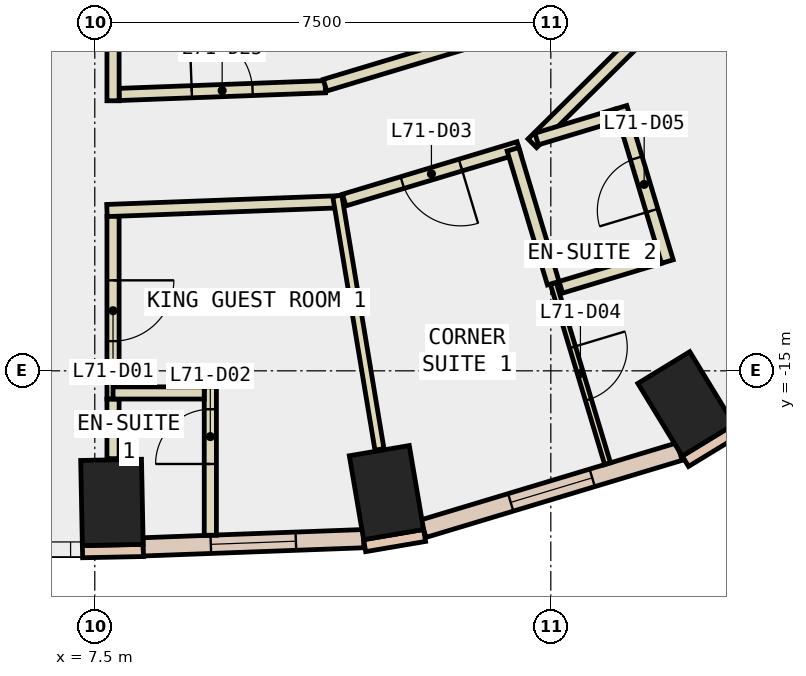
"""IFC4 building model, lengths in metres.
Left out: names, types, materials, properties, quantities, classifications, styles, units other than length and angle.
Written with IfcOpenShell. Run it as: python <this file> out.ifc"""

import sys

from ifc_helpers import new_model, si_unit, direction, frame, frame_2d, origin, origin_2d, place, context, subcontext, project, spatial, rectangle, extrude, element, fill, save


model = new_model("IFC4")
c1 = context("Model", 3, precision=1e-05, world=origin(), true_north=direction((0.0, 1.0)))
c2 = subcontext(c1, "Body", "Model", "MODEL_VIEW")
j1 = project(units=[si_unit("LENGTHUNIT", "METRE"), si_unit("PLANEANGLEUNIT", "RADIAN")], contexts=[c1])
p1 = place(None, origin())
s1 = spatial("IfcSite", under=j1, at=p1, CompositionType="ELEMENT")
p2 = place(p1, origin())
s2 = spatial("IfcBuilding", under=s1, at=p2, CompositionType="ELEMENT")
p3 = place(p2, frame((0.0, 0.0, 304.4)))
s3 = spatial("IfcBuildingStorey", under=s2, at=p3, CompositionType="ELEMENT", Elevation=304.4)
for number, where, z_axis, x_axis in (
    (1, (7.782, -17.164, -0.34), (0.0, 0.0, 1.0), (1.0, 0.02, 0.0)),
    (2, (12.297, -17.003, -0.34), (0.0, 0.0, 1.0), (0.986, 0.168, 0.0)),
    (3, (17.223, -15.544, -0.34), (0.0, 0.0, 1.0), (0.854, 0.521, 0.0)),
):
    element("IfcColumn", number, at=place(p3, frame(where, z_axis=z_axis, x_axis=x_axis)), inside=s3, PredefinedType="COLUMN", context=c2, shape_type="SweptSolid", body=[
        extrude(rectangle(XDim=1.0, YDim=1.4, at=origin_2d()), origin(), (0.0, 0.0, 1.0), 3.6),
    ])
for number, where, z_axis, x_axis in (
    (4, (7.298, -17.974, 0.0), (0.0, 0.0, 1.0), (1.0, 0.02, 0.0)),
    (5, (11.938, -17.875, 0.0), (0.0, 0.0, 1.0), (0.986, 0.168, 0.0)),
):
    element("IfcWall", number, at=place(p3, frame(where, z_axis=z_axis, x_axis=x_axis)), inside=s3, PredefinedType="STANDARD", context=c2, shape_type="SweptSolid", body=[
        extrude(rectangle(XDim=1.0, YDim=0.2, at=frame_2d((0.5, 0.0))), origin(), (0.0, 0.0, 1.0), 3.26),
    ])
p4 = place(p3, frame((17.213, -16.487, 0.0), z_axis=(0.0, 0.0, 1.0), x_axis=(0.853679739553, 0.520798331677, 0.0)))
e6 = element("IfcWall", 6, at=p4, inside=s3, PredefinedType="STANDARD", context=c2, shape_type="SweptSolid", body=[
    extrude(rectangle(XDim=1.0, YDim=0.2, at=frame_2d((0.5, 0.0))), origin(), (0.0, 0.0, 1.0), 3.26),
])
p5 = place(p3, frame((8.296, -17.895, 0.0), z_axis=(0.0, 0.0, 1.0), x_axis=(0.999306787149, 0.037228284377, 0.0)))
e7 = element("IfcWall", 7, at=p5, inside=s3, PredefinedType="STANDARD", context=c2, shape_type="SweptSolid", body=[
    extrude(rectangle(XDim=3.626, YDim=0.3, at=frame_2d((1.813, 0.0))), origin(), (0.0, 0.0, 1.0), 3.26),
])
p6 = place(p5, frame((1.113, 0.0, 0.9)))
e8 = element("IfcOpeningElement", 8, at=p6, cuts=e7, PredefinedType="OPENING", context=c2, shape_type="SweptSolid", body=[
    extrude(rectangle(XDim=1.4, YDim=2.0, at=frame_2d((0.7, 1.0))), frame((0.0, 0.16, 0.0), z_axis=(0.0, -1.0, 0.0), x_axis=(1.0, 0.0, 0.0)), (0.0, 0.0, 1.0), 0.32),
])
p7 = place(p3, frame((12.904, -17.596, 0.0), z_axis=(0.0, 0.0, 1.0), x_axis=(0.957563190743, 0.288223412884, 0.0)))
e9 = element("IfcWall", 9, at=p7, inside=s3, PredefinedType="STANDARD", context=c2, shape_type="SweptSolid", body=[
    extrude(rectangle(XDim=4.4, YDim=0.3, at=frame_2d((2.2, 0.0))), origin(), (0.0, 0.0, 1.0), 3.26),
])
p8 = place(p7, frame((1.5, 0.0, 0.9)))
e10 = element("IfcOpeningElement", 10, at=p8, cuts=e9, PredefinedType="OPENING", context=c2, shape_type="SweptSolid", body=[
    extrude(rectangle(XDim=1.4, YDim=2.0, at=frame_2d((0.7, 1.0))), frame((0.0, 0.16, 0.0), z_axis=(0.0, -1.0, 0.0), x_axis=(1.0, 0.0, 0.0)), (0.0, 0.0, 1.0), 0.32),
])
p9 = place(p3, frame((17.976, -15.82, 0.0), z_axis=(0.0, 0.0, 1.0), x_axis=(0.710893699296, 0.703299472701, 0.0)))
e11 = element("IfcWall", 11, at=p9, inside=s3, PredefinedType="STANDARD", context=c2, shape_type="SweptSolid", body=[
    extrude(rectangle(XDim=3.954, YDim=0.3, at=frame_2d((1.977, 0.0))), origin(), (0.0, 0.0, 1.0), 3.26),
])
p10 = place(p9, frame((1.277, 0.0, 0.9)))
e12 = element("IfcOpeningElement", 12, at=p10, cuts=e11, PredefinedType="OPENING", context=c2, shape_type="SweptSolid", body=[
    extrude(rectangle(XDim=1.4, YDim=2.0, at=frame_2d((0.7, 1.0))), frame((0.0, 0.16, 0.0), z_axis=(0.0, -1.0, 0.0), x_axis=(1.0, 0.0, 0.0)), (0.0, 0.0, 1.0), 0.32),
])
p11 = place(p3, frame((7.9, -10.455, 0.0), z_axis=(0.0, 0.0, 1.0), x_axis=(0.999297278907, 0.037482640915, 0.0)))
e13 = element("IfcWall", 13, at=p11, inside=s3, PredefinedType="PARTITIONING", context=c2, shape_type="SweptSolid", body=[
    extrude(rectangle(XDim=3.394, YDim=0.2, at=frame_2d((1.697, 0.0))), origin(), (0.0, 0.0, 1.0), 3.26),
])
p12 = place(p11, frame((1.196, 0.0, 0.0)))
e14 = element("IfcOpeningElement", 14, at=p12, cuts=e13, PredefinedType="OPENING", context=c2, shape_type="SweptSolid", body=[
    extrude(rectangle(XDim=1.0, YDim=2.1, at=frame_2d((0.5, 1.05))), frame((0.0, 0.11, 0.0), z_axis=(0.0, -1.0, 0.0), x_axis=(1.0, 0.0, 0.0)), (0.0, 0.0, 1.0), 0.22),
])
p13 = place(p3, frame((11.286, -10.303, 0.0), z_axis=(0.0, 0.0, 1.0), x_axis=(0.957555754851, 0.288248115955, 0.0)))
e15 = element("IfcWall", 15, at=p13, inside=s3, PredefinedType="PARTITIONING", context=c2, shape_type="SweptSolid", body=[
    extrude(rectangle(XDim=2.612, YDim=0.2, at=frame_2d((1.306, 0.0))), origin(), (0.0, 0.0, 1.0), 3.26),
])
p14 = place(p3, frame((11.53, -12.22, 0.0), z_axis=(0.0, 0.0, 1.0), x_axis=(-0.999293554816, -0.037581794833, 0.0)))
e16 = element("IfcWall", 16, at=p14, inside=s3, PredefinedType="PARTITIONING", context=c2, shape_type="SweptSolid", body=[
    extrude(rectangle(XDim=3.833, YDim=0.2, at=frame_2d((1.917, 0.0))), origin(), (0.0, 0.0, 1.0), 3.26),
])
p15 = place(p3, frame((14.473, -11.328, 0.0), z_axis=(0.0, 0.0, 1.0), x_axis=(-0.957599689503, -0.288102125406, 0.0)))
e17 = element("IfcWall", 17, at=p15, inside=s3, PredefinedType="PARTITIONING", context=c2, shape_type="SweptSolid", body=[
    extrude(rectangle(XDim=2.999, YDim=0.2, at=frame_2d((1.5, 0.0))), origin(), (0.0, 0.0, 1.0), 3.26),
])
p16 = place(p15, frame((1.0, 0.0, 0.0)))
e18 = element("IfcOpeningElement", 18, at=p16, cuts=e17, PredefinedType="OPENING", context=c2, shape_type="SweptSolid", body=[
    extrude(rectangle(XDim=1.0, YDim=2.1, at=frame_2d((0.5, 1.05))), frame((0.0, 0.11, 0.0), z_axis=(0.0, -1.0, 0.0), x_axis=(1.0, 0.0, 0.0)), (0.0, 0.0, 1.0), 0.22),
])
p17 = place(p3, frame((16.537, -9.436, 0.0), z_axis=(0.0, 0.0, 1.0), x_axis=(-0.710773151724, -0.703421301063, 0.0)))
e19 = element("IfcWall", 19, at=p17, inside=s3, PredefinedType="PARTITIONING", context=c2, shape_type="SweptSolid", body=[
    extrude(rectangle(XDim=2.59, YDim=0.2, at=frame_2d((1.295, 0.0))), origin(), (0.0, 0.0, 1.0), 3.26),
])
p18 = place(p3, frame((7.8, -5.899, 0.0), z_axis=(0.0, 0.0, 1.0), x_axis=(0.0, -1.0, 0.0)))
e20 = element("IfcWall", 20, at=p18, inside=s3, PredefinedType="PARTITIONING", context=c2, shape_type="SweptSolid", body=[
    extrude(rectangle(XDim=4.66, YDim=0.2, at=frame_2d((2.33, 0.0))), origin(), (0.0, 0.0, 1.0), 3.26),
])
p19 = place(p3, frame((7.8, -12.46, 0.0), z_axis=(0.0, 0.0, 1.0), x_axis=(0.0, -1.0, 0.0)))
e21 = element("IfcWall", 21, at=p19, inside=s3, PredefinedType="PARTITIONING", context=c2, shape_type="SweptSolid", body=[
    extrude(rectangle(XDim=3.004, YDim=0.2, at=frame_2d((1.502, 0.0))), origin(), (0.0, 0.0, 1.0), 3.26),
])
p20 = place(p19, frame((1.052, 0.0, 0.0)))
e22 = element("IfcOpeningElement", 22, at=p20, cuts=e21, PredefinedType="OPENING", context=c2, shape_type="SweptSolid", body=[
    extrude(rectangle(XDim=1.0, YDim=2.1, at=frame_2d((0.5, 1.05))), frame((0.0, 0.11, 0.0), z_axis=(0.0, -1.0, 0.0), x_axis=(1.0, 0.0, 0.0)), (0.0, 0.0, 1.0), 0.22),
])
p21 = place(p3, frame((7.8, -15.464, 0.0), z_axis=(0.0, 0.0, 1.0), x_axis=(0.0, -1.0, 0.0)))
e23 = element("IfcWall", 23, at=p21, inside=s3, PredefinedType="PARTITIONING", context=c2, shape_type="SweptSolid", body=[
    extrude(rectangle(XDim=0.98, YDim=0.2, at=frame_2d((0.49, 0.0))), origin(), (0.0, 0.0, 1.0), 3.26),
])
p22 = place(p3, frame((9.4, -17.704, 0.0), z_axis=(0.0, 0.0, 1.0), x_axis=(0.0, 1.0, 0.0)))
e24 = element("IfcWall", 24, at=p22, inside=s3, PredefinedType="PARTITIONING", context=c2, shape_type="SweptSolid", body=[
    extrude(rectangle(XDim=2.44, YDim=0.2, at=frame_2d((1.22, 0.0))), origin(), (0.0, 0.0, 1.0), 3.26),
])
p23 = place(p22, frame((1.172, 0.0, 0.0)))
e25 = element("IfcOpeningElement", 25, at=p23, cuts=e24, PredefinedType="OPENING", context=c2, shape_type="SweptSolid", body=[
    extrude(rectangle(XDim=0.9, YDim=2.1, at=frame_2d((0.45, 1.05))), frame((0.0, 0.11, 0.0), z_axis=(0.0, -1.0, 0.0), x_axis=(1.0, 0.0, 0.0)), (0.0, 0.0, 1.0), 0.22),
])
p24 = place(p3, frame((9.3, -15.364, 0.0), z_axis=(0.0, 0.0, 1.0), x_axis=(-1.0, 0.0, 0.0)))
e26 = element("IfcWall", 26, at=p24, inside=s3, PredefinedType="PARTITIONING", context=c2, shape_type="SweptSolid", body=[
    extrude(rectangle(XDim=1.5, YDim=0.2, at=frame_2d((0.75, 0.0))), origin(), (0.0, 0.0, 1.0), 3.26),
])
p25 = place(p3, frame((11.488, -12.123, 0.0), z_axis=(0.0, 0.0, 1.0), x_axis=(0.164174159643, -0.986431368776, 0.0)))
e27 = element("IfcWall", 27, at=p25, inside=s3, PredefinedType="PARTITIONING", context=c2, shape_type="SweptSolid", body=[
    extrude(rectangle(XDim=4.226, YDim=0.15, at=frame_2d((2.113, 0.0))), origin(), (0.0, 0.0, 1.0), 3.26),
])
p26 = place(p3, frame((15.04, -13.559, 0.0), z_axis=(0.0, 0.0, 1.0), x_axis=(0.288337370875, -0.957528882362, 0.0)))
e28 = element("IfcWall", 28, at=p26, inside=s3, PredefinedType="PARTITIONING", context=c2, shape_type="SweptSolid", body=[
    extrude(rectangle(XDim=3.101, YDim=0.1, at=frame_2d((1.55, 0.0))), origin(), (0.0, 0.0, 1.0), 3.26),
])
p27 = place(p26, frame((1.1, 0.0, 0.0)))
e29 = element("IfcOpeningElement", 29, at=p27, cuts=e28, PredefinedType="OPENING", context=c2, shape_type="SweptSolid", body=[
    extrude(rectangle(XDim=0.9, YDim=2.1, at=frame_2d((0.45, 1.05))), frame((0.0, 0.06, 0.0), z_axis=(0.0, -1.0, 0.0), x_axis=(1.0, 0.0, 0.0)), (0.0, 0.0, 1.0), 0.12),
])
p28 = place(p3, frame((14.378, -11.357, 0.0), z_axis=(0.0, 0.0, 1.0), x_axis=(0.287932252498, -0.957650780802, 0.0)))
e30 = element("IfcWall", 30, at=p28, inside=s3, PredefinedType="PARTITIONING", context=c2, shape_type="SweptSolid", body=[
    extrude(rectangle(XDim=2.3, YDim=0.2, at=frame_2d((1.15, 0.0))), origin(), (0.0, 0.0, 1.0), 3.26),
])
p29 = place(p3, frame((15.165, -13.626, 0.0), z_axis=(0.0, 0.0, 1.0), x_axis=(0.957565028189, 0.288217308275, 0.0)))
e31 = element("IfcWall", 31, at=p29, inside=s3, PredefinedType="PARTITIONING", context=c2, shape_type="SweptSolid", body=[
    extrude(rectangle(XDim=1.7, YDim=0.2, at=frame_2d((0.85, 0.0))), origin(), (0.0, 0.0, 1.0), 3.26),
])
p30 = place(p3, frame((16.917, -13.203, 0.0), z_axis=(0.0, 0.0, 1.0), x_axis=(-0.287998855134, 0.957630753183, 0.0)))
e32 = element("IfcWall", 32, at=p30, inside=s3, PredefinedType="PARTITIONING", context=c2, shape_type="SweptSolid", body=[
    extrude(rectangle(XDim=2.649, YDim=0.2, at=frame_2d((1.325, 0.0))), origin(), (0.0, 0.0, 1.0), 3.26),
])
p31 = place(p30, frame((0.875, 0.0, 0.0)))
e33 = element("IfcOpeningElement", 33, at=p31, cuts=e32, PredefinedType="OPENING", context=c2, shape_type="SweptSolid", body=[
    extrude(rectangle(XDim=0.9, YDim=2.1, at=frame_2d((0.45, 1.05))), frame((0.0, 0.11, 0.0), z_axis=(0.0, -1.0, 0.0), x_axis=(1.0, 0.0, 0.0)), (0.0, 0.0, 1.0), 0.22),
])
p32 = place(p3, frame((16.087, -10.79, 0.0), z_axis=(0.0, 0.0, 1.0), x_axis=(-0.957425655367, -0.288679951581, 0.0)))
e34 = element("IfcWall", 34, at=p32, inside=s3, PredefinedType="PARTITIONING", context=c2, shape_type="SweptSolid", body=[
    extrude(rectangle(XDim=1.378, YDim=0.2, at=frame_2d((0.689, 0.0))), origin(), (0.0, 0.0, 1.0), 3.26),
])
p33 = place(p6, origin())
e35 = element("IfcWindow", 35, at=p33, inside=s3, PartitioningType="SINGLE_PANEL", PredefinedType="WINDOW", context=c2, shape_type="SweptSolid", body=[
    extrude(rectangle(XDim=1.4, YDim=2.0, at=frame_2d((0.7, 1.0))), frame((0.0, 0.03, 0.0), z_axis=(0.0, -1.0, 0.0), x_axis=(1.0, 0.0, 0.0)), (0.0, 0.0, 1.0), 0.06),
])
fill(e8, e35)
p34 = place(p8, origin())
e36 = element("IfcWindow", 36, at=p34, inside=s3, PartitioningType="SINGLE_PANEL", PredefinedType="WINDOW", context=c2, shape_type="SweptSolid", body=[
    extrude(rectangle(XDim=1.4, YDim=2.0, at=frame_2d((0.7, 1.0))), frame((0.0, 0.03, 0.0), z_axis=(0.0, -1.0, 0.0), x_axis=(1.0, 0.0, 0.0)), (0.0, 0.0, 1.0), 0.06),
])
fill(e10, e36)
p35 = place(p20, origin())
e37 = element("IfcDoor", 37, at=p35, inside=s3, OperationType="SINGLE_SWING_RIGHT", PredefinedType="DOOR", context=c2, shape_type="SweptSolid", body=[
    extrude(rectangle(XDim=1.0, YDim=2.1, at=frame_2d((0.5, 1.05))), frame((0.0, 0.025, 0.0), z_axis=(0.0, -1.0, 0.0), x_axis=(1.0, 0.0, 0.0)), (0.0, 0.0, 1.0), 0.05),
])
fill(e22, e37)
p36 = place(p23, origin())
e38 = element("IfcDoor", 38, at=p36, inside=s3, OperationType="SINGLE_SWING_RIGHT", PredefinedType="DOOR", context=c2, shape_type="SweptSolid", body=[
    extrude(rectangle(XDim=0.9, YDim=2.1, at=frame_2d((0.45, 1.05))), frame((0.0, 0.025, 0.0), z_axis=(0.0, -1.0, 0.0), x_axis=(1.0, 0.0, 0.0)), (0.0, 0.0, 1.0), 0.05),
])
fill(e25, e38)
p37 = place(p16, origin())
e39 = element("IfcDoor", 39, at=p37, inside=s3, OperationType="SINGLE_SWING_LEFT", PredefinedType="DOOR", context=c2, shape_type="SweptSolid", body=[
    extrude(rectangle(XDim=1.0, YDim=2.1, at=frame_2d((0.5, 1.05))), frame((0.0, 0.025, 0.0), z_axis=(0.0, -1.0, 0.0), x_axis=(1.0, 0.0, 0.0)), (0.0, 0.0, 1.0), 0.05),
])
fill(e18, e39)
p38 = place(p27, origin())
e40 = element("IfcDoor", 40, at=p38, inside=s3, OperationType="SINGLE_SWING_LEFT", PredefinedType="DOOR", context=c2, shape_type="SweptSolid", body=[
    extrude(rectangle(XDim=0.9, YDim=2.1, at=frame_2d((0.45, 1.05))), frame((0.0, 0.025, 0.0), z_axis=(0.0, -1.0, 0.0), x_axis=(1.0, 0.0, 0.0)), (0.0, 0.0, 1.0), 0.05),
])
fill(e29, e40)
p39 = place(p31, origin())
e41 = element("IfcDoor", 41, at=p39, inside=s3, OperationType="SINGLE_SWING_LEFT", PredefinedType="DOOR", context=c2, shape_type="SweptSolid", body=[
    extrude(rectangle(XDim=0.9, YDim=2.1, at=frame_2d((0.45, 1.05))), frame((0.0, 0.025, 0.0), z_axis=(0.0, -1.0, 0.0), x_axis=(1.0, 0.0, 0.0)), (0.0, 0.0, 1.0), 0.05),
])
fill(e33, e41)
p40 = place(p12, origin())
e42 = element("IfcDoor", 42, at=p40, inside=s3, OperationType="SINGLE_SWING_LEFT", PredefinedType="DOOR", context=c2, shape_type="SweptSolid", body=[
    extrude(rectangle(XDim=1.0, YDim=2.1, at=frame_2d((0.5, 1.05))), frame((0.0, 0.025, 0.0), z_axis=(0.0, -1.0, 0.0), x_axis=(1.0, 0.0, 0.0)), (0.0, 0.0, 1.0), 0.05),
])
fill(e14, e42)
save(model, sys.argv[1])
